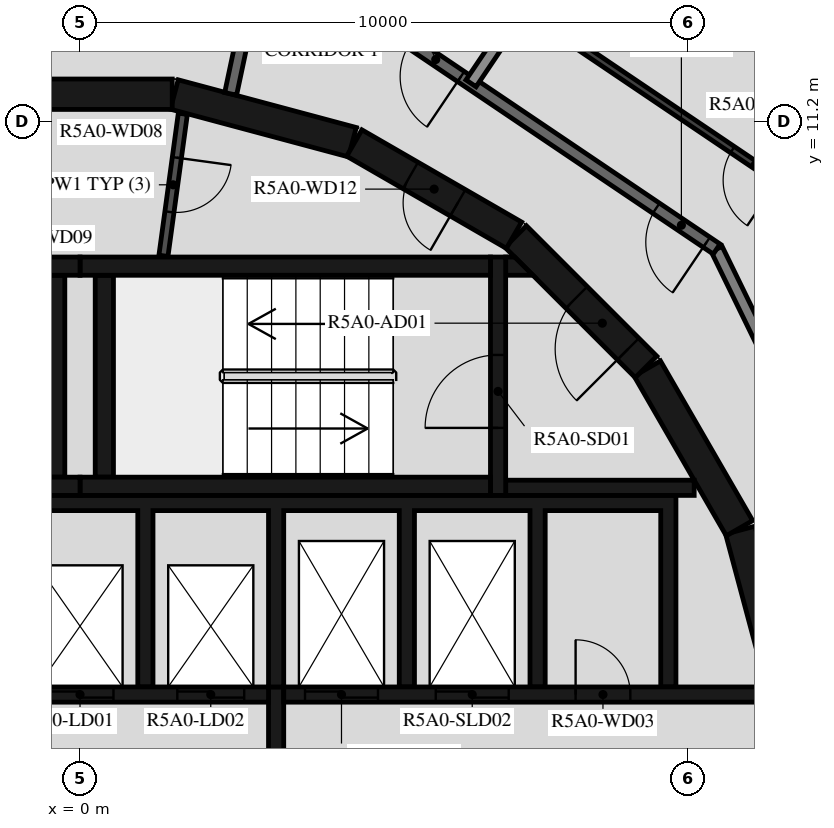
"""IFC4 building model, lengths in metres.
Left out: names, types, materials, properties, quantities, classifications, styles, units other than length and angle.
Written with IfcOpenShell. Run it as: python <this file> out.ifc"""

import sys

from ifc_helpers import new_model, si_unit, direction, frame, frame_2d, origin, place, context, subcontext, project, spatial, polyline, rectangle, outline, extrude, element, fill, save


model = new_model("IFC4")
c1 = context("Model", 3, precision=1e-05, world=origin(), true_north=direction((0.0, 1.0)))
c2 = subcontext(c1, "Body", "Model", "MODEL_VIEW")
j1 = project(units=[si_unit("LENGTHUNIT", "METRE"), si_unit("PLANEANGLEUNIT", "RADIAN")], contexts=[c1])
p1 = place(None, origin())
s1 = spatial("IfcSite", under=j1, at=p1, CompositionType="ELEMENT")
p2 = place(p1, origin())
s2 = spatial("IfcBuilding", under=s1, at=p2, CompositionType="ELEMENT")
p3 = place(p2, frame((0.0, 0.0, 188.4)))
s3 = spatial("IfcBuildingStorey", under=s2, at=p3, CompositionType="ELEMENT", Elevation=188.4)
p4 = place(p3, frame((-0.808, 27.101, 0.03), z_axis=(0.0, 0.0, 1.0), x_axis=(0.76040780846, -0.649445890613, 0.0)))
e1 = element("IfcWall", 1, at=p4, inside=s3, PredefinedType="PARAPET", context=c2, shape_type="SweptSolid", body=[
    extrude(rectangle(XDim=36.429, YDim=0.2, at=frame_2d((18.214, 0.0))), origin(), (0.0, 0.0, 1.0), 1.5),
])
for number, where, z_axis, x_axis in (
    (2, (11.643, 1.55, 0.0), (0.0, 0.0, 1.0), (-0.259, 0.966, 0.0)),
    (3, (10.845, 4.51, 0.0), (0.0, 0.0, 1.0), (-0.5, 0.866, 0.0)),
):
    element("IfcWall", number, at=place(p3, frame(where, z_axis=z_axis, x_axis=x_axis)), inside=s3, PredefinedType="SHEAR", context=c2, shape_type="SweptSolid", body=[
        extrude(rectangle(XDim=3.033, YDim=0.5, at=frame_2d((1.516, 0.0))), origin(), (0.0, 0.0, 1.0), 3.12),
    ])
p5 = place(p3, frame((9.308, 7.164, 0.0), z_axis=(0.0, 0.0, 1.0), x_axis=(-0.707106781187, 0.707106781187, 0.0)))
e4 = element("IfcWall", 4, at=p5, inside=s3, PredefinedType="SHEAR", context=c2, shape_type="SweptSolid", body=[
    extrude(rectangle(XDim=3.032, YDim=0.5, at=frame_2d((1.516, 0.0))), origin(), (0.0, 0.0, 1.0), 3.12),
])
p6 = place(p5, frame((0.416, 0.0, 0.0)))
e5 = element("IfcOpeningElement", 5, at=p6, cuts=e4, PredefinedType="OPENING", context=c2, shape_type="SweptSolid", body=[
    extrude(rectangle(XDim=1.2, YDim=2.1, at=frame_2d((0.6, 1.05))), frame((0.0, 0.26, 0.0), z_axis=(0.0, -1.0, 0.0), x_axis=(1.0, 0.0, 0.0)), (0.0, 0.0, 1.0), 0.52),
])
p7 = place(p3, frame((7.137, 9.329, 0.0), z_axis=(0.0, 0.0, 1.0), x_axis=(-0.865975092491, 0.500087131594, 0.0)))
e6 = element("IfcWall", 6, at=p7, inside=s3, PredefinedType="SHEAR", context=c2, shape_type="SweptSolid", body=[
    extrude(rectangle(XDim=3.033, YDim=0.5, at=frame_2d((1.516, 0.0))), origin(), (0.0, 0.0, 1.0), 3.12),
])
p8 = place(p7, frame((1.066, 0.0, 0.0)))
e7 = element("IfcOpeningElement", 7, at=p8, cuts=e6, PredefinedType="OPENING", context=c2, shape_type="SweptSolid", body=[
    extrude(rectangle(XDim=0.9, YDim=2.1, at=frame_2d((0.45, 1.05))), frame((0.0, 0.26, 0.0), z_axis=(0.0, -1.0, 0.0), x_axis=(1.0, 0.0, 0.0)), (0.0, 0.0, 1.0), 0.52),
])
for number, where, z_axis, x_axis in (
    (8, (4.479, 10.858, 0.0), (0.0, 0.0, 1.0), (-0.966, 0.259, 0.0)),
    (9, (1.516, 11.647, 0.0), (0.0, 0.0, 1.0), (-1.0, 0.0, 0.0)),
):
    element("IfcWall", number, at=place(p3, frame(where, z_axis=z_axis, x_axis=x_axis)), inside=s3, PredefinedType="SHEAR", context=c2, shape_type="SweptSolid", body=[
        extrude(rectangle(XDim=3.033, YDim=0.5, at=frame_2d((1.516, 0.0))), origin(), (0.0, 0.0, 1.0), 3.12),
    ])
for number, where, z_axis, x_axis in (
    (10, (0.0, 5.2, 0.0), (0.0, 0.0, 1.0), (1.0, 0.0, 0.0)),
    (11, (0.0, 8.82, 0.0), (0.0, 0.0, 1.0), (1.0, 0.0, 0.0)),
):
    element("IfcWall", number, at=place(p3, frame(where, z_axis=z_axis, x_axis=x_axis)), inside=s3, PredefinedType="SHEAR", context=c2, shape_type="SweptSolid", body=[
        extrude(rectangle(XDim=6.75, YDim=0.3, at=frame_2d((3.375, 0.0))), origin(), (0.0, 0.0, 1.0), 3.12),
    ])
p9 = place(p3, frame((0.4, 5.35, 0.0), z_axis=(0.0, 0.0, 1.0), x_axis=(0.0, 1.0, 0.0)))
e12 = element("IfcWall", 12, at=p9, inside=s3, PredefinedType="SHEAR", context=c2, shape_type="SweptSolid", body=[
    extrude(rectangle(XDim=3.32, YDim=0.3, at=frame_2d((1.66, 0.0))), origin(), (0.0, 0.0, 1.0), 3.12),
])
p10 = place(p3, frame((6.875, 5.05, 0.0), z_axis=(0.0, 0.0, 1.0), x_axis=(0.0, 1.0, 0.0)))
e13 = element("IfcWall", 13, at=p10, inside=s3, PredefinedType="SHEAR", context=c2, shape_type="SweptSolid", body=[
    extrude(rectangle(XDim=3.92, YDim=0.25, at=frame_2d((1.96, 0.0))), origin(), (0.0, 0.0, 1.0), 3.12),
])
p11 = place(p10, frame((1.11, 0.0, 0.0)))
e14 = element("IfcOpeningElement", 14, at=p11, cuts=e13, PredefinedType="OPENING", context=c2, shape_type="SweptSolid", body=[
    extrude(rectangle(XDim=1.2, YDim=2.1, at=frame_2d((0.6, 1.05))), frame((0.0, 0.135, 0.0), z_axis=(0.0, -1.0, 0.0), x_axis=(1.0, 0.0, 0.0)), (0.0, 0.0, 1.0), 0.27),
])
p12 = place(p3, frame((7.0, 5.175, 0.0), z_axis=(0.0, 0.0, 1.0), x_axis=(1.0, 0.0, 0.0)))
e15 = element("IfcWall", 15, at=p12, inside=s3, PredefinedType="SHEAR", context=c2, shape_type="SweptSolid", body=[
    extrude(rectangle(XDim=3.1, YDim=0.25, at=frame_2d((1.55, 0.0))), origin(), (0.0, 0.0, 1.0), 3.12),
])
p13 = place(p3, origin())
e16 = element("IfcWall", 16, at=p13, inside=s3, PredefinedType="SHEAR", context=c2, shape_type="SweptSolid", body=[
    extrude(outline(polyline([(7.448, 8.67), (7.0, 8.67), (7.0, 8.97), (7.148, 8.97), (7.448, 8.67)])), origin(), (0.0, 0.0, 1.0), 3.12),
])
for number, where, z_axis, x_axis in (
    (17, (-6.75, 5.2, 0.0), (0.0, 0.0, 1.0), (1.0, 0.0, 0.0)),
    (18, (-6.75, 8.82, 0.0), (0.0, 0.0, 1.0), (1.0, 0.0, 0.0)),
):
    element("IfcWall", number, at=place(p3, frame(where, z_axis=z_axis, x_axis=x_axis)), inside=s3, PredefinedType="SHEAR", context=c2, shape_type="SweptSolid", body=[
        extrude(rectangle(XDim=6.75, YDim=0.3, at=frame_2d((3.375, 0.0))), origin(), (0.0, 0.0, 1.0), 3.12),
    ])
p14 = place(p3, frame((-0.4, 5.35, 0.0), z_axis=(0.0, 0.0, 1.0), x_axis=(0.0, 1.0, 0.0)))
e19 = element("IfcWall", 19, at=p14, inside=s3, PredefinedType="SHEAR", context=c2, shape_type="SweptSolid", body=[
    extrude(rectangle(XDim=3.32, YDim=0.3, at=frame_2d((1.66, 0.0))), origin(), (0.0, 0.0, 1.0), 3.12),
])
p15 = place(p3, origin())
e20 = element("IfcWall", 20, at=p15, inside=s3, PredefinedType="SHEAR", context=c2, shape_type="SweptSolid", body=[
    extrude(outline(polyline([(-9.55, 4.8), (-5.5, 4.8), (-5.5, 1.9), (-5.25, 1.9), (-5.25, 4.8), (-1.2, 4.8), (-1.2, 1.9), (-0.95, 1.9), (-0.95, 4.8), (0.95, 4.8), (0.95, 1.9), (1.2, 1.9), (1.2, 4.8), (3.1, 4.8), (3.1, 1.9), (3.35, 1.9), (3.35, 4.8), (5.25, 4.8), (5.25, 1.9), (5.5, 1.9), (5.5, 4.8), (7.4, 4.8), (7.4, 1.9), (7.65, 1.9), (7.65, 4.8), (9.55, 4.8), (9.55, 1.9), (9.8, 1.9), (9.8, 4.8), (9.8, 5.05), (-9.8, 5.05), (-9.8, 4.8), (-9.8, 1.9), (-9.55, 1.9), (-9.55, 4.8)])), origin(), (0.0, 0.0, 1.0), 3.12),
])
p16 = place(p3, frame((-11.28, 1.775, 0.0), z_axis=(0.0, 0.0, 1.0), x_axis=(1.0, 0.0, 0.0)))
e21 = element("IfcWall", 21, at=p16, inside=s3, PredefinedType="SHEAR", context=c2, shape_type="SweptSolid", body=[
    extrude(rectangle(XDim=14.38, YDim=0.25, at=frame_2d((7.19, 0.0))), origin(), (0.0, 0.0, 1.0), 3.12),
])
p17 = place(p16, frame((10.73, 0.0, 0.0)))
e22 = element("IfcOpeningElement", 22, at=p17, cuts=e21, PredefinedType="OPENING", context=c2, shape_type="SweptSolid", body=[
    extrude(rectangle(XDim=1.1, YDim=2.1, at=frame_2d((0.55, 1.05))), frame((0.0, 0.135, 0.0), z_axis=(0.0, -1.0, 0.0), x_axis=(1.0, 0.0, 0.0)), (0.0, 0.0, 1.0), 0.27),
])
p18 = place(p16, frame((12.88, 0.0, 0.0)))
e23 = element("IfcOpeningElement", 23, at=p18, cuts=e21, PredefinedType="OPENING", context=c2, shape_type="SweptSolid", body=[
    extrude(rectangle(XDim=1.1, YDim=2.1, at=frame_2d((0.55, 1.05))), frame((0.0, 0.135, 0.0), z_axis=(0.0, -1.0, 0.0), x_axis=(1.0, 0.0, 0.0)), (0.0, 0.0, 1.0), 0.27),
])
p19 = place(p16, frame((3.305, 0.0, 0.0)))
e24 = element("IfcOpeningElement", 24, at=p19, cuts=e21, PredefinedType="OPENING", context=c2, shape_type="SweptSolid", body=[
    extrude(rectangle(XDim=0.9, YDim=2.1, at=frame_2d((0.45, 1.05))), frame((0.0, 0.135, 0.0), z_axis=(0.0, -1.0, 0.0), x_axis=(1.0, 0.0, 0.0)), (0.0, 0.0, 1.0), 0.27),
])
p20 = place(p16, frame((7.605, 0.0, 0.0)))
e25 = element("IfcOpeningElement", 25, at=p20, cuts=e21, PredefinedType="OPENING", context=c2, shape_type="SweptSolid", body=[
    extrude(rectangle(XDim=0.9, YDim=2.1, at=frame_2d((0.45, 1.05))), frame((0.0, 0.135, 0.0), z_axis=(0.0, -1.0, 0.0), x_axis=(1.0, 0.0, 0.0)), (0.0, 0.0, 1.0), 0.27),
])
p21 = place(p3, frame((3.35, 1.775, 0.0), z_axis=(0.0, 0.0, 1.0), x_axis=(1.0, 0.0, 0.0)))
e26 = element("IfcWall", 26, at=p21, inside=s3, PredefinedType="SHEAR", context=c2, shape_type="SweptSolid", body=[
    extrude(rectangle(XDim=7.93, YDim=0.25, at=frame_2d((3.965, 0.0))), origin(), (0.0, 0.0, 1.0), 3.12),
])
p22 = place(p21, frame((0.35, 0.0, 0.0)))
e27 = element("IfcOpeningElement", 27, at=p22, cuts=e26, PredefinedType="OPENING", context=c2, shape_type="SweptSolid", body=[
    extrude(rectangle(XDim=1.2, YDim=2.4, at=frame_2d((0.6, 1.2))), frame((0.0, 0.135, 0.0), z_axis=(0.0, -1.0, 0.0), x_axis=(1.0, 0.0, 0.0)), (0.0, 0.0, 1.0), 0.27),
])
p23 = place(p21, frame((2.5, 0.0, 0.0)))
e28 = element("IfcOpeningElement", 28, at=p23, cuts=e26, PredefinedType="OPENING", context=c2, shape_type="SweptSolid", body=[
    extrude(rectangle(XDim=1.2, YDim=2.4, at=frame_2d((0.6, 1.2))), frame((0.0, 0.135, 0.0), z_axis=(0.0, -1.0, 0.0), x_axis=(1.0, 0.0, 0.0)), (0.0, 0.0, 1.0), 0.27),
])
p24 = place(p21, frame((4.8, 0.0, 0.0)))
e29 = element("IfcOpeningElement", 29, at=p24, cuts=e26, PredefinedType="OPENING", context=c2, shape_type="SweptSolid", body=[
    extrude(rectangle(XDim=0.9, YDim=2.1, at=frame_2d((0.45, 1.05))), frame((0.0, 0.135, 0.0), z_axis=(0.0, -1.0, 0.0), x_axis=(1.0, 0.0, 0.0)), (0.0, 0.0, 1.0), 0.27),
])
p25 = place(p3, frame((3.225, -1.9, 0.0), z_axis=(0.0, 0.0, 1.0), x_axis=(0.0, 1.0, 0.0)))
e30 = element("IfcWall", 30, at=p25, inside=s3, PredefinedType="SHEAR", context=c2, shape_type="SweptSolid", body=[
    extrude(rectangle(XDim=3.8, YDim=0.25, at=frame_2d((1.9, 0.0))), origin(), (0.0, 0.0, 1.0), 3.12),
])
p26 = place(p3, frame((1.691, 11.326, 0.0), z_axis=(0.0, 0.0, 1.0), x_axis=(-0.135344253201, -0.990798633994, 0.0)))
e31 = element("IfcWall", 31, at=p26, inside=s3, PredefinedType="PARTITIONING", context=c2, shape_type="SweptSolid", body=[
    extrude(rectangle(XDim=2.358, YDim=0.15, at=frame_2d((1.179, 0.0))), origin(), (0.0, 0.0, 1.0), 3.12),
])
p27 = place(p26, frame((0.729, 0.0, 0.0)))
e32 = element("IfcOpeningElement", 32, at=p27, cuts=e31, PredefinedType="OPENING", context=c2, shape_type="SweptSolid", body=[
    extrude(rectangle(XDim=0.9, YDim=2.1, at=frame_2d((0.45, 1.05))), frame((0.0, 0.085, 0.0), z_axis=(0.0, -1.0, 0.0), x_axis=(1.0, 0.0, 0.0)), (0.0, 0.0, 1.0), 0.17),
])
p28 = place(p3, frame((13.618, 2.647, 0.0), z_axis=(0.0, 0.0, 1.0), x_axis=(-0.438366026218, 0.898796543751, 0.0)))
e33 = element("IfcWall", 33, at=p28, inside=s3, PredefinedType="STANDARD", context=c2, shape_type="SweptSolid", body=[
    extrude(rectangle(XDim=7.181, YDim=0.2, at=frame_2d((3.591, 0.0))), origin(), (0.0, 0.0, 1.0), 3.12),
])
p29 = place(p3, frame((10.47, 9.101, 0.0), z_axis=(0.0, 0.0, 1.0), x_axis=(-0.829035841718, 0.559195469534, 0.0)))
e34 = element("IfcWall", 34, at=p29, inside=s3, PredefinedType="STANDARD", context=c2, shape_type="SweptSolid", body=[
    extrude(rectangle(XDim=7.181, YDim=0.2, at=frame_2d((3.591, 0.0))), origin(), (0.0, 0.0, 1.0), 3.12),
])
p30 = place(p29, frame((0.2, 0.0, 0.0)))
e35 = element("IfcOpeningElement", 35, at=p30, cuts=e34, PredefinedType="OPENING", context=c2, shape_type="SweptSolid", body=[
    extrude(rectangle(XDim=1.0, YDim=2.1, at=frame_2d((0.5, 1.05))), frame((0.0, 0.11, 0.0), z_axis=(0.0, -1.0, 0.0), x_axis=(1.0, 0.0, 0.0)), (0.0, 0.0, 1.0), 0.22),
])
p31 = place(p29, frame((5.073, 0.0, 0.0)))
e36 = element("IfcOpeningElement", 36, at=p31, cuts=e34, PredefinedType="OPENING", context=c2, shape_type="SweptSolid", body=[
    extrude(rectangle(XDim=1.0, YDim=2.1, at=frame_2d((0.5, 1.05))), frame((0.0, 0.11, 0.0), z_axis=(0.0, -1.0, 0.0), x_axis=(1.0, 0.0, 0.0)), (0.0, 0.0, 1.0), 0.22),
])
p32 = place(p3, frame((2.813, 13.236, 0.0), z_axis=(0.0, 0.0, 1.0), x_axis=(-0.207911086063, -0.978147729278, 0.0)))
e37 = element("IfcWall", 37, at=p32, inside=s3, PredefinedType="STANDARD", context=c2, shape_type="SweptSolid", body=[
    extrude(rectangle(XDim=1.618, YDim=0.2, at=frame_2d((0.809, 0.0))), origin(), (0.0, 0.0, 1.0), 3.12),
])
p33 = place(p3, frame((9.104, 15.79, 0.0), z_axis=(0.0, 0.0, 1.0), x_axis=(-0.559193912135, -0.829036892201, 0.0)))
e38 = element("IfcWall", 38, at=p33, inside=s3, PredefinedType="STANDARD", context=c2, shape_type="SweptSolid", body=[
    extrude(rectangle(XDim=4.781, YDim=0.2, at=frame_2d((2.39, 0.0))), origin(), (0.0, 0.0, 1.0), 2.73),
])
p34 = place(p3, frame((11.642, 10.12, 0.0), z_axis=(0.0, 0.0, 1.0), x_axis=(-0.829032241779, 0.55920080659, 0.0)))
e39 = element("IfcWall", 39, at=p34, inside=s3, PredefinedType="PARTITIONING", context=c2, shape_type="SweptSolid", body=[
    extrude(rectangle(XDim=7.985, YDim=0.12, at=frame_2d((3.992, 0.0))), origin(), (0.0, 0.0, 1.0), 3.12),
])
p35 = place(p34, frame((0.2, 0.0, 0.0)))
e40 = element("IfcOpeningElement", 40, at=p35, cuts=e39, PredefinedType="OPENING", context=c2, shape_type="SweptSolid", body=[
    extrude(rectangle(XDim=0.9, YDim=2.1, at=frame_2d((0.45, 1.05))), frame((0.0, 0.07, 0.0), z_axis=(0.0, -1.0, 0.0), x_axis=(1.0, 0.0, 0.0)), (0.0, 0.0, 1.0), 0.14),
])
p36 = place(p34, frame((5.475, 0.0, 0.0)))
e41 = element("IfcOpeningElement", 41, at=p36, cuts=e39, PredefinedType="OPENING", context=c2, shape_type="SweptSolid", body=[
    extrude(rectangle(XDim=0.9, YDim=2.1, at=frame_2d((0.45, 1.05))), frame((0.0, 0.07, 0.0), z_axis=(0.0, -1.0, 0.0), x_axis=(1.0, 0.0, 0.0)), (0.0, 0.0, 1.0), 0.14),
])
p37 = place(p11, origin())
e42 = element("IfcDoor", 42, at=p37, inside=s3, OperationType="SINGLE_SWING_LEFT", PredefinedType="DOOR", context=c2, shape_type="SweptSolid", body=[
    extrude(rectangle(XDim=1.2, YDim=2.1, at=frame_2d((0.6, 1.05))), frame((0.0, 0.025, 0.0), z_axis=(0.0, -1.0, 0.0), x_axis=(1.0, 0.0, 0.0)), (0.0, 0.0, 1.0), 0.05),
])
fill(e14, e42)
p38 = place(p6, origin())
e43 = element("IfcDoor", 43, at=p38, inside=s3, OperationType="SINGLE_SWING_RIGHT", PredefinedType="DOOR", context=c2, shape_type="SweptSolid", body=[
    extrude(rectangle(XDim=1.2, YDim=2.1, at=frame_2d((0.6, 1.05))), frame((0.0, 0.025, 0.0), z_axis=(0.0, -1.0, 0.0), x_axis=(1.0, 0.0, 0.0)), (0.0, 0.0, 1.0), 0.05),
])
fill(e5, e43)
p39 = place(p17, origin())
e44 = element("IfcDoor", 44, at=p39, inside=s3, OperationType="DOUBLE_DOOR_SLIDING", PredefinedType="DOOR", context=c2, shape_type="SweptSolid", body=[
    extrude(rectangle(XDim=1.1, YDim=2.1, at=frame_2d((0.55, 1.05))), frame((0.0, 0.025, 0.0), z_axis=(0.0, -1.0, 0.0), x_axis=(1.0, 0.0, 0.0)), (0.0, 0.0, 1.0), 0.05),
])
fill(e22, e44)
p40 = place(p18, origin())
e45 = element("IfcDoor", 45, at=p40, inside=s3, OperationType="DOUBLE_DOOR_SLIDING", PredefinedType="DOOR", context=c2, shape_type="SweptSolid", body=[
    extrude(rectangle(XDim=1.1, YDim=2.1, at=frame_2d((0.55, 1.05))), frame((0.0, 0.025, 0.0), z_axis=(0.0, -1.0, 0.0), x_axis=(1.0, 0.0, 0.0)), (0.0, 0.0, 1.0), 0.05),
])
fill(e23, e45)
p41 = place(p22, origin())
e46 = element("IfcDoor", 46, at=p41, inside=s3, OperationType="DOUBLE_DOOR_SLIDING", PredefinedType="DOOR", context=c2, shape_type="SweptSolid", body=[
    extrude(rectangle(XDim=1.2, YDim=2.4, at=frame_2d((0.6, 1.2))), frame((0.0, 0.025, 0.0), z_axis=(0.0, -1.0, 0.0), x_axis=(1.0, 0.0, 0.0)), (0.0, 0.0, 1.0), 0.05),
])
fill(e27, e46)
p42 = place(p23, origin())
e47 = element("IfcDoor", 47, at=p42, inside=s3, OperationType="DOUBLE_DOOR_SLIDING", PredefinedType="DOOR", context=c2, shape_type="SweptSolid", body=[
    extrude(rectangle(XDim=1.2, YDim=2.4, at=frame_2d((0.6, 1.2))), frame((0.0, 0.025, 0.0), z_axis=(0.0, -1.0, 0.0), x_axis=(1.0, 0.0, 0.0)), (0.0, 0.0, 1.0), 0.05),
])
fill(e28, e47)
p43 = place(p24, origin())
e48 = element("IfcDoor", 48, at=p43, inside=s3, OperationType="SINGLE_SWING_LEFT", PredefinedType="DOOR", context=c2, shape_type="SweptSolid", body=[
    extrude(rectangle(XDim=0.9, YDim=2.1, at=frame_2d((0.45, 1.05))), frame((0.0, 0.025, 0.0), z_axis=(0.0, -1.0, 0.0), x_axis=(1.0, 0.0, 0.0)), (0.0, 0.0, 1.0), 0.05),
])
fill(e29, e48)
p44 = place(p27, origin())
e49 = element("IfcDoor", 49, at=p44, inside=s3, OperationType="SINGLE_SWING_RIGHT", PredefinedType="DOOR", context=c2, shape_type="SweptSolid", body=[
    extrude(rectangle(XDim=0.9, YDim=2.1, at=frame_2d((0.45, 1.05))), frame((0.0, 0.025, 0.0), z_axis=(0.0, -1.0, 0.0), x_axis=(1.0, 0.0, 0.0)), (0.0, 0.0, 1.0), 0.05),
])
fill(e32, e49)
p45 = place(p8, origin())
e50 = element("IfcDoor", 50, at=p45, inside=s3, OperationType="SINGLE_SWING_RIGHT", PredefinedType="DOOR", context=c2, shape_type="SweptSolid", body=[
    extrude(rectangle(XDim=0.9, YDim=2.1, at=frame_2d((0.45, 1.05))), frame((0.0, 0.025, 0.0), z_axis=(0.0, -1.0, 0.0), x_axis=(1.0, 0.0, 0.0)), (0.0, 0.0, 1.0), 0.05),
])
fill(e7, e50)
p46 = place(p30, origin())
e51 = element("IfcDoor", 51, at=p46, inside=s3, OperationType="SINGLE_SWING_LEFT", PredefinedType="DOOR", context=c2, shape_type="SweptSolid", body=[
    extrude(rectangle(XDim=1.0, YDim=2.1, at=frame_2d((0.5, 1.05))), frame((0.0, 0.025, 0.0), z_axis=(0.0, -1.0, 0.0), x_axis=(1.0, 0.0, 0.0)), (0.0, 0.0, 1.0), 0.05),
])
fill(e35, e51)
p47 = place(p35, origin())
e52 = element("IfcDoor", 52, at=p47, inside=s3, OperationType="SINGLE_SWING_LEFT", PredefinedType="DOOR", context=c2, shape_type="SweptSolid", body=[
    extrude(rectangle(XDim=0.9, YDim=2.1, at=frame_2d((0.45, 1.05))), frame((0.0, 0.025, 0.0), z_axis=(0.0, -1.0, 0.0), x_axis=(1.0, 0.0, 0.0)), (0.0, 0.0, 1.0), 0.05),
])
fill(e40, e52)
p48 = place(p31, origin())
e53 = element("IfcDoor", 53, at=p48, inside=s3, OperationType="SINGLE_SWING_RIGHT", PredefinedType="DOOR", context=c2, shape_type="SweptSolid", body=[
    extrude(rectangle(XDim=1.0, YDim=2.1, at=frame_2d((0.5, 1.05))), frame((0.0, 0.025, 0.0), z_axis=(0.0, -1.0, 0.0), x_axis=(1.0, 0.0, 0.0)), (0.0, 0.0, 1.0), 0.05),
])
fill(e36, e53)
save(model, sys.argv[1])
